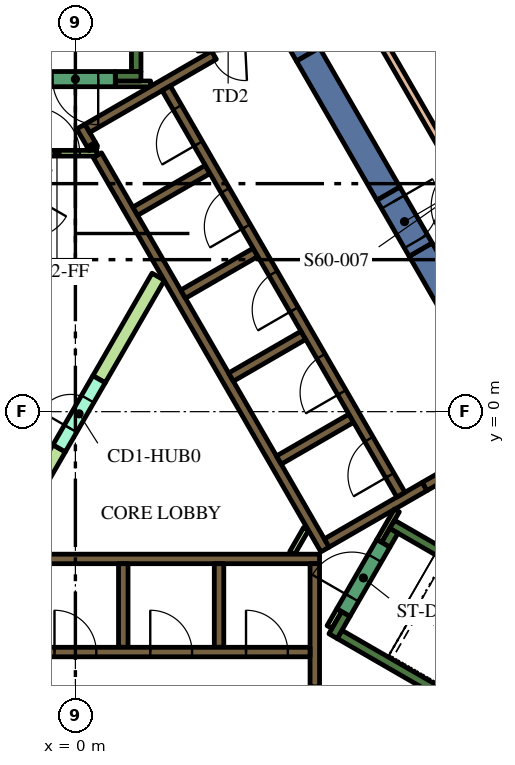
"""IFC4 building model, lengths in metres.
Left out: names, types, materials, properties, quantities, classifications, styles, units other than length and angle.
Written with IfcOpenShell. Run it as: python <this file> out.ifc"""

import sys

from ifc_helpers import new_model, si_unit, direction, frame, frame_2d, origin, place, context, subcontext, project, spatial, polyline, rectangle, outline, extrude, element, fill, save


model = new_model("IFC4")
c1 = context("Model", 3, precision=1e-05, world=origin(), true_north=direction((0.0, 1.0)))
c2 = subcontext(c1, "Body", "Model", "MODEL_VIEW")
j1 = project(units=[si_unit("LENGTHUNIT", "METRE"), si_unit("PLANEANGLEUNIT", "RADIAN")], contexts=[c1])
p1 = place(None, origin())
s1 = spatial("IfcSite", under=j1, at=p1, CompositionType="ELEMENT")
p2 = place(p1, origin())
s2 = spatial("IfcBuilding", under=s1, at=p2, CompositionType="ELEMENT")
p3 = place(p2, frame((0.0, 0.0, 256.2)))
s3 = spatial("IfcBuildingStorey", under=s2, at=p3, CompositionType="ELEMENT", Elevation=256.2)
p4 = place(p3, frame((9.085, 4.264, 0.0), z_axis=(0.0, 0.0, 1.0), x_axis=(0.499998082512, -0.866026510844, 0.0)))
e1 = element("IfcWall", 1, at=p4, inside=s3, PredefinedType="SOLIDWALL", context=c2, shape_type="SweptSolid", body=[
    extrude(rectangle(XDim=12.472, YDim=0.7, at=frame_2d((6.236, 0.0))), origin(), (0.0, 0.0, 1.0), 5.4),
])
p5 = place(p3, frame((6.12, 9.399, 0.0), z_axis=(0.0, 0.0, 1.0), x_axis=(-0.499792463624, 0.866145191815, 0.0)))
e2 = element("IfcWall", 2, at=p5, inside=s3, PredefinedType="SOLIDWALL", context=c2, shape_type="SweptSolid", body=[
    extrude(rectangle(XDim=0.302, YDim=0.7, at=frame_2d((0.151, 0.0))), origin(), (0.0, 0.0, 1.0), 5.4),
])
p6 = place(p3, frame((6.121, 9.398, 0.0), z_axis=(0.0, 0.0, 1.0), x_axis=(0.499995697976, -0.866027887545, 0.0)))
e3 = element("IfcWall", 3, at=p6, inside=s3, PredefinedType="SOLIDWALL", context=c2, shape_type="SweptSolid", body=[
    extrude(rectangle(XDim=4.228, YDim=0.7, at=frame_2d((2.114, 0.0))), origin(), (0.0, 0.0, 1.0), 5.4),
])
p7 = place(p3, frame((12.84, -9.261, 0.0), z_axis=(0.0, 0.0, 1.0), x_axis=(-0.866013990052, 0.500019768644, 0.0)))
e4 = element("IfcWall", 4, at=p7, inside=s3, PredefinedType="SOLIDWALL", context=c2, shape_type="SweptSolid", body=[
    extrude(rectangle(XDim=6.8, YDim=0.25, at=frame_2d((3.4, 0.0))), origin(), (0.0, 0.0, 1.0), 5.4),
])
p8 = place(p3, frame((6.78, -5.906, 0.0), z_axis=(0.0, 0.0, 1.0), x_axis=(0.500223362819, 0.865896406789, 0.0)))
e5 = element("IfcWall", 5, at=p8, inside=s3, PredefinedType="SOLIDWALL", context=c2, shape_type="SweptSolid", body=[
    extrude(rectangle(XDim=0.675, YDim=0.25, at=frame_2d((0.337, 0.0))), origin(), (0.0, 0.0, 1.0), 5.4),
])
p9 = place(p3, frame((8.334, -2.964, 0.0), z_axis=(0.0, 0.0, 1.0), x_axis=(0.866016039709, -0.500016218704, 0.0)))
e6 = element("IfcWall", 6, at=p9, inside=s3, PredefinedType="SOLIDWALL", context=c2, shape_type="SweptSolid", body=[
    extrude(rectangle(XDim=7.05, YDim=0.25, at=frame_2d((3.525, 0.0))), origin(), (0.0, 0.0, 1.0), 5.4),
])
p10 = place(p3, frame((8.168, -3.503, 0.0), z_axis=(0.0, 0.0, 1.0), x_axis=(0.49972245349, 0.866185586049, 0.0)))
e7 = element("IfcWall", 7, at=p10, inside=s3, PredefinedType="SOLIDWALL", context=c2, shape_type="SweptSolid", body=[
    extrude(rectangle(XDim=0.425, YDim=0.25, at=frame_2d((0.212, 0.0))), origin(), (0.0, 0.0, 1.0), 5.4),
])
p11 = place(p3, frame((1.6, 8.95, 0.0), z_axis=(0.0, 0.0, 1.0), x_axis=(0.0, 1.0, 0.0)))
e8 = element("IfcWall", 8, at=p11, inside=s3, PredefinedType="SOLIDWALL", context=c2, shape_type="SweptSolid", body=[
    extrude(rectangle(XDim=6.8, YDim=0.25, at=frame_2d((3.4, 0.0))), origin(), (0.0, 0.0, 1.0), 5.4),
])
p12 = place(p3, frame((1.05, 8.825, 0.0), z_axis=(0.0, 0.0, 1.0), x_axis=(1.0, 0.0, 0.0)))
e9 = element("IfcWall", 9, at=p12, inside=s3, PredefinedType="SOLIDWALL", context=c2, shape_type="SweptSolid", body=[
    extrude(rectangle(XDim=0.675, YDim=0.25, at=frame_2d((0.337, 0.0))), origin(), (0.0, 0.0, 1.0), 5.4),
])
p13 = place(p3, frame((-5.545, -3.875, 0.0), z_axis=(0.0, 0.0, 1.0), x_axis=(1.0, 0.0, 0.0)))
e10 = element("IfcWall", 10, at=p13, inside=s3, PredefinedType="SOLIDWALL", context=c2, shape_type="SweptSolid", body=[
    extrude(rectangle(XDim=11.97, YDim=0.25, at=frame_2d((5.985, 0.0))), origin(), (0.0, 0.0, 1.0), 5.4),
])
p14 = place(p3, frame((6.3, -7.24, 0.0), z_axis=(0.0, 0.0, 1.0), x_axis=(0.0, 1.0, 0.0)))
e11 = element("IfcWall", 11, at=p14, inside=s3, PredefinedType="SOLIDWALL", context=c2, shape_type="SweptSolid", body=[
    extrude(rectangle(XDim=3.24, YDim=0.25, at=frame_2d((1.62, 0.0))), origin(), (0.0, 0.0, 1.0), 5.4),
])
for number, where, z_axis, x_axis in (
    (12, (3.78, -4.0, 0.0), (0.0, 0.0, 1.0), (0.0, -1.0, 0.0)),
    (13, (1.26, -4.0, 0.0), (0.0, 0.0, 1.0), (0.0, -1.0, 0.0)),
):
    element("IfcWall", number, at=place(p3, frame(where, z_axis=z_axis, x_axis=x_axis)), inside=s3, PredefinedType="SOLIDWALL", context=c2, shape_type="SweptSolid", body=[
        extrude(rectangle(XDim=2.2, YDim=0.25, at=frame_2d((1.1, 0.0))), origin(), (0.0, 0.0, 1.0), 5.4),
    ])
p15 = place(p3, frame((0.473, 6.93, 0.0), z_axis=(0.0, 0.0, 1.0), x_axis=(-0.49972245349, 0.866185586049, 0.0)))
e14 = element("IfcWall", 14, at=p15, inside=s3, PredefinedType="SOLIDWALL", context=c2, shape_type="SweptSolid", body=[
    extrude(rectangle(XDim=0.11, YDim=0.25, at=frame_2d((0.055, 0.0))), origin(), (0.0, 0.0, 1.0), 5.4),
])
p16 = place(p3, frame((6.568, -3.627, 0.0), z_axis=(0.0, 0.0, 1.0), x_axis=(-0.499999455981, 0.866025717874, 0.0)))
e15 = element("IfcWall", 15, at=p16, inside=s3, PredefinedType="SOLIDWALL", context=c2, shape_type="SweptSolid", body=[
    extrude(rectangle(XDim=11.978, YDim=0.25, at=frame_2d((5.989, 0.0))), origin(), (0.0, 0.0, 1.0), 5.4),
])
p17 = place(p3, frame((0.417, 7.027, 0.0), z_axis=(0.0, 0.0, 1.0), x_axis=(-0.500210807569, 0.865903659763, 0.0)))
e16 = element("IfcWall", 16, at=p17, inside=s3, PredefinedType="SOLIDWALL", context=c2, shape_type="SweptSolid", body=[
    extrude(rectangle(XDim=0.548, YDim=0.25, at=frame_2d((0.274, 0.0))), origin(), (0.0, 0.0, 1.0), 5.4),
])
p18 = place(p3, frame((3.647, 9.38, 0.0), z_axis=(0.0, 0.0, 1.0), x_axis=(-0.866025015791, -0.500000672024, 0.0)))
e17 = element("IfcWall", 17, at=p18, inside=s3, PredefinedType="SOLIDWALL", context=c2, shape_type="SweptSolid", body=[
    extrude(rectangle(XDim=3.849, YDim=0.25, at=frame_2d((1.924, 0.0))), origin(), (0.0, 0.0, 1.0), 5.4),
])
p19 = place(p3, frame((1.574, 5.274, 0.0), z_axis=(0.0, 0.0, 1.0), x_axis=(0.866028486751, 0.499994660107, 0.0)))
e18 = element("IfcWall", 18, at=p19, inside=s3, PredefinedType="SOLIDWALL", context=c2, shape_type="SweptSolid", body=[
    extrude(rectangle(XDim=2.2, YDim=0.25, at=frame_2d((1.1, 0.0))), origin(), (0.0, 0.0, 1.0), 5.4),
])
for number, where, z_axis, x_axis in (
    (19, (2.834, 3.091, 0.0), (0.0, 0.0, 1.0), (0.866, 0.5, 0.0)),
    (20, (4.094, 0.909, 0.0), (0.0, 0.0, 1.0), (0.866, 0.5, 0.0)),
    (21, (5.354, -1.274, 0.0), (0.0, 0.0, 1.0), (0.866, 0.5, 0.0)),
):
    element("IfcWall", number, at=place(p3, frame(where, z_axis=z_axis, x_axis=x_axis)), inside=s3, PredefinedType="SOLIDWALL", context=c2, shape_type="SweptSolid", body=[
        extrude(rectangle(XDim=2.2, YDim=0.25, at=frame_2d((1.1, 0.0))), origin(), (0.0, 0.0, 1.0), 5.4),
    ])
p20 = place(p3, frame((6.614, -3.456, 0.0), z_axis=(0.0, 0.0, 1.0), x_axis=(0.866032512851, 0.499987686533, 0.0)))
e22 = element("IfcWall", 22, at=p20, inside=s3, PredefinedType="SOLIDWALL", context=c2, shape_type="SweptSolid", body=[
    extrude(rectangle(XDim=2.975, YDim=0.25, at=frame_2d((1.487, 0.0))), origin(), (0.0, 0.0, 1.0), 5.4),
])
p21 = place(p3, frame((1.05, 8.625, 0.0), z_axis=(0.0, 0.0, 1.0), x_axis=(1.0, 0.0, 0.0)))
e23 = element("IfcWall", 23, at=p21, inside=s3, PredefinedType="PARTITIONING", context=c2, shape_type="SweptSolid", body=[
    extrude(rectangle(XDim=0.929, YDim=0.15, at=frame_2d((0.464, 0.0))), origin(), (0.0, 0.0, 1.0), 4.3),
])
p22 = place(p3, frame((6.945, -5.222, 0.0), z_axis=(0.0, 0.0, 1.0), x_axis=(-0.499818422106, -0.866130212453, 0.0)))
e24 = element("IfcWall", 24, at=p22, inside=s3, PredefinedType="PARTITIONING", context=c2, shape_type="SweptSolid", body=[
    extrude(rectangle(XDim=0.514, YDim=0.15, at=frame_2d((0.257, 0.0))), origin(), (0.0, 0.0, 1.0), 4.3),
])
p23 = place(p3, frame((8.459, -2.599, 0.0), z_axis=(0.0, 0.0, 1.0), x_axis=(-0.500041054325, -0.866001699761, 0.0)))
e25 = element("IfcWall", 25, at=p23, inside=s3, PredefinedType="PARTITIONING", context=c2, shape_type="SweptSolid", body=[
    extrude(rectangle(XDim=0.929, YDim=0.15, at=frame_2d((0.464, 0.0))), origin(), (0.0, 0.0, 1.0), 5.4),
])
p24 = place(p3, frame((5.705, -3.718, 0.0), z_axis=(0.0, 0.0, 1.0), x_axis=(0.499962090823, 0.866047289552, 0.0)))
e26 = element("IfcWall", 26, at=p24, inside=s3, PredefinedType="PARTITIONING", context=c2, shape_type="SweptSolid", body=[
    extrude(rectangle(XDim=0.735, YDim=0.15, at=frame_2d((0.367, 0.0))), origin(), (0.0, 0.0, 1.0), 4.3),
])
p25 = place(p3, origin())
e27 = element("IfcWall", 27, at=p25, inside=s3, PredefinedType="PARTITIONING", context=c2, shape_type="SweptSolid", body=[
    extrude(outline(polyline([(2.017, 3.643), (2.342, 3.456), (0.785, 0.76), (0.46, 0.947), (2.017, 3.643)])), origin(), (0.0, 0.0, 1.0), 4.3),
])
e28 = element("IfcWall", 28, at=p25, inside=s3, PredefinedType="PARTITIONING", context=c2, shape_type="SweptSolid", body=[
    extrude(outline(polyline([(-0.59, -0.872), (-0.265, -1.059), (-1.822, -3.756), (-2.147, -3.568), (-0.59, -0.872)])), origin(), (0.0, 0.0, 1.0), 4.3),
])
p26 = place(p3, frame((-6.175, -6.325, 0.0), z_axis=(0.0, 0.0, 1.0), x_axis=(1.0, 0.0, 0.0)))
e29 = element("IfcWall", 29, at=p26, inside=s3, PredefinedType="SOLIDWALL", context=c2, shape_type="SweptSolid", body=[
    extrude(rectangle(XDim=12.35, YDim=0.25, at=frame_2d((6.175, 0.0))), origin(), (0.0, 0.0, 1.0), 5.4),
])
p27 = place(p26, frame((0.585, 0.0, 0.0)))
e30 = element("IfcOpeningElement", 30, at=p27, cuts=e29, PredefinedType="OPENING", context=c2, shape_type="SweptSolid", body=[
    extrude(rectangle(XDim=1.1, YDim=2.1, at=frame_2d((0.55, 1.05))), frame((0.0, 0.135, 0.0), z_axis=(0.0, -1.0, 0.0), x_axis=(1.0, 0.0, 0.0)), (0.0, 0.0, 1.0), 0.27),
])
p28 = place(p26, frame((3.105, 0.0, 0.0)))
e31 = element("IfcOpeningElement", 31, at=p28, cuts=e29, PredefinedType="OPENING", context=c2, shape_type="SweptSolid", body=[
    extrude(rectangle(XDim=1.1, YDim=2.1, at=frame_2d((0.55, 1.05))), frame((0.0, 0.135, 0.0), z_axis=(0.0, -1.0, 0.0), x_axis=(1.0, 0.0, 0.0)), (0.0, 0.0, 1.0), 0.27),
])
p29 = place(p26, frame((5.625, 0.0, 0.0)))
e32 = element("IfcOpeningElement", 32, at=p29, cuts=e29, PredefinedType="OPENING", context=c2, shape_type="SweptSolid", body=[
    extrude(rectangle(XDim=1.1, YDim=2.1, at=frame_2d((0.55, 1.05))), frame((0.0, 0.135, 0.0), z_axis=(0.0, -1.0, 0.0), x_axis=(1.0, 0.0, 0.0)), (0.0, 0.0, 1.0), 0.27),
])
p30 = place(p26, frame((8.145, 0.0, 0.0)))
e33 = element("IfcOpeningElement", 33, at=p30, cuts=e29, PredefinedType="OPENING", context=c2, shape_type="SweptSolid", body=[
    extrude(rectangle(XDim=1.1, YDim=2.1, at=frame_2d((0.55, 1.05))), frame((0.0, 0.135, 0.0), z_axis=(0.0, -1.0, 0.0), x_axis=(1.0, 0.0, 0.0)), (0.0, 0.0, 1.0), 0.27),
])
p31 = place(p26, frame((10.665, 0.0, 0.0)))
e34 = element("IfcOpeningElement", 34, at=p31, cuts=e29, PredefinedType="OPENING", context=c2, shape_type="SweptSolid", body=[
    extrude(rectangle(XDim=1.1, YDim=2.1, at=frame_2d((0.55, 1.05))), frame((0.0, 0.135, 0.0), z_axis=(0.0, -1.0, 0.0), x_axis=(1.0, 0.0, 0.0)), (0.0, 0.0, 1.0), 0.27),
])
p32 = place(p3, frame((8.565, -2.185, 0.0), z_axis=(0.0, 0.0, 1.0), x_axis=(-0.499997954832, 0.866026584559, 0.0)))
e35 = element("IfcWall", 35, at=p32, inside=s3, PredefinedType="SOLIDWALL", context=c2, shape_type="SweptSolid", body=[
    extrude(rectangle(XDim=12.35, YDim=0.25, at=frame_2d((6.175, 0.0))), origin(), (0.0, 0.0, 1.0), 5.4),
])
p33 = place(p32, frame((0.585, 0.0, 0.0)))
e36 = element("IfcOpeningElement", 36, at=p33, cuts=e35, PredefinedType="OPENING", context=c2, shape_type="SweptSolid", body=[
    extrude(rectangle(XDim=1.1, YDim=2.1, at=frame_2d((0.55, 1.05))), frame((0.0, 0.135, 0.0), z_axis=(0.0, -1.0, 0.0), x_axis=(1.0, 0.0, 0.0)), (0.0, 0.0, 1.0), 0.27),
])
p34 = place(p32, frame((3.105, 0.0, 0.0)))
e37 = element("IfcOpeningElement", 37, at=p34, cuts=e35, PredefinedType="OPENING", context=c2, shape_type="SweptSolid", body=[
    extrude(rectangle(XDim=1.1, YDim=2.1, at=frame_2d((0.55, 1.05))), frame((0.0, 0.135, 0.0), z_axis=(0.0, -1.0, 0.0), x_axis=(1.0, 0.0, 0.0)), (0.0, 0.0, 1.0), 0.27),
])
p35 = place(p32, frame((5.625, 0.0, 0.0)))
e38 = element("IfcOpeningElement", 38, at=p35, cuts=e35, PredefinedType="OPENING", context=c2, shape_type="SweptSolid", body=[
    extrude(rectangle(XDim=1.1, YDim=2.1, at=frame_2d((0.55, 1.05))), frame((0.0, 0.135, 0.0), z_axis=(0.0, -1.0, 0.0), x_axis=(1.0, 0.0, 0.0)), (0.0, 0.0, 1.0), 0.27),
])
p36 = place(p32, frame((8.145, 0.0, 0.0)))
e39 = element("IfcOpeningElement", 39, at=p36, cuts=e35, PredefinedType="OPENING", context=c2, shape_type="SweptSolid", body=[
    extrude(rectangle(XDim=1.1, YDim=2.1, at=frame_2d((0.55, 1.05))), frame((0.0, 0.135, 0.0), z_axis=(0.0, -1.0, 0.0), x_axis=(1.0, 0.0, 0.0)), (0.0, 0.0, 1.0), 0.27),
])
p37 = place(p32, frame((10.665, 0.0, 0.0)))
e40 = element("IfcOpeningElement", 40, at=p37, cuts=e35, PredefinedType="OPENING", context=c2, shape_type="SweptSolid", body=[
    extrude(rectangle(XDim=1.1, YDim=2.1, at=frame_2d((0.55, 1.05))), frame((0.0, 0.135, 0.0), z_axis=(0.0, -1.0, 0.0), x_axis=(1.0, 0.0, 0.0)), (0.0, 0.0, 1.0), 0.27),
])
p38 = place(p3, frame((7.053, -5.284, 0.0), z_axis=(0.0, 0.0, 1.0), x_axis=(0.500078061341, 0.865980330357, 0.0)))
e41 = element("IfcWall", 41, at=p38, inside=s3, PredefinedType="SOLIDWALL", context=c2, shape_type="SweptSolid", body=[
    extrude(rectangle(XDim=2.1, YDim=0.4, at=frame_2d((1.05, 0.0))), origin(), (0.0, 0.0, 1.0), 5.4),
])
p39 = place(p38, frame((0.45, 0.0, 0.0)))
e42 = element("IfcOpeningElement", 42, at=p39, cuts=e41, PredefinedType="OPENING", context=c2, shape_type="SweptSolid", body=[
    extrude(rectangle(XDim=1.2, YDim=2.1, at=frame_2d((0.6, 1.05))), frame((0.0, 0.21, 0.0), z_axis=(0.0, -1.0, 0.0), x_axis=(1.0, 0.0, 0.0)), (0.0, 0.0, 1.0), 0.42),
])
p40 = place(p3, frame((1.05, 8.75, 0.0), z_axis=(0.0, 0.0, 1.0), x_axis=(-1.0, 0.0, 0.0)))
e43 = element("IfcWall", 43, at=p40, inside=s3, PredefinedType="SOLIDWALL", context=c2, shape_type="SweptSolid", body=[
    extrude(rectangle(XDim=2.1, YDim=0.4, at=frame_2d((1.05, 0.0))), origin(), (0.0, 0.0, 1.0), 5.4),
])
p41 = place(p40, frame((0.45, 0.0, 0.0)))
e44 = element("IfcOpeningElement", 44, at=p41, cuts=e43, PredefinedType="OPENING", context=c2, shape_type="SweptSolid", body=[
    extrude(rectangle(XDim=1.2, YDim=2.1, at=frame_2d((0.6, 1.05))), frame((0.0, 0.21, 0.0), z_axis=(0.0, -1.0, 0.0), x_axis=(1.0, 0.0, 0.0)), (0.0, 0.0, 1.0), 0.42),
])
p42 = place(p3, frame((-0.427, -0.966, 0.0), z_axis=(0.0, 0.0, 1.0), x_axis=(0.49994051562, 0.866059744384, 0.0)))
e45 = element("IfcWall", 45, at=p42, inside=s3, PredefinedType="PARTITIONING", context=c2, shape_type="SweptSolid", body=[
    extrude(rectangle(XDim=2.1, YDim=0.375, at=frame_2d((1.05, 0.0))), origin(), (0.0, 0.0, 1.0), 4.3),
])
p43 = place(p42, frame((0.6, 0.0, 0.0)))
e46 = element("IfcOpeningElement", 46, at=p43, cuts=e45, PredefinedType="OPENING", context=c2, shape_type="SweptSolid", body=[
    extrude(rectangle(XDim=0.9, YDim=2.1, at=frame_2d((0.45, 1.05))), frame((0.0, 0.198, 0.0), z_axis=(0.0, -1.0, 0.0), x_axis=(1.0, 0.0, 0.0)), (0.0, 0.0, 1.0), 0.395),
])
p44 = place(p3, frame((-1.534, 6.8, 0.0), z_axis=(0.0, 0.0, 1.0), x_axis=(1.0, 0.0, 0.0)))
e47 = element("IfcWall", 47, at=p44, inside=s3, PredefinedType="PARTITIONING", context=c2, shape_type="SweptSolid", body=[
    extrude(rectangle(XDim=2.1, YDim=0.15, at=frame_2d((1.05, 0.0))), origin(), (0.0, 0.0, 1.0), 4.3),
])
p45 = place(p44, frame((0.45, 0.0, 0.0)))
e48 = element("IfcOpeningElement", 48, at=p45, cuts=e47, PredefinedType="OPENING", context=c2, shape_type="SweptSolid", body=[
    extrude(rectangle(XDim=1.2, YDim=2.1, at=frame_2d((0.6, 1.05))), frame((0.0, 0.085, 0.0), z_axis=(0.0, -1.0, 0.0), x_axis=(1.0, 0.0, 0.0)), (0.0, 0.0, 1.0), 0.17),
])
p46 = place(p3, frame((11.009, -0.919, 0.0), z_axis=(0.0, 0.0, 1.0), x_axis=(-0.866059744384, -0.49994051562, 0.0)))
e49 = element("IfcWall", 49, at=p46, inside=s3, PredefinedType="SOLIDWALL", context=c2, shape_type="SweptSolid", body=[
    extrude(rectangle(XDim=2.1, YDim=0.25, at=frame_2d((1.05, 0.0))), origin(), (0.0, 0.0, 1.0), 5.4),
])
p47 = place(p46, frame((0.45, 0.0, 0.0)))
e50 = element("IfcOpeningElement", 50, at=p47, cuts=e49, PredefinedType="OPENING", context=c2, shape_type="SweptSolid", body=[
    extrude(rectangle(XDim=1.2, YDim=2.1, at=frame_2d((0.6, 1.05))), frame((0.0, 0.135, 0.0), z_axis=(0.0, -1.0, 0.0), x_axis=(1.0, 0.0, 0.0)), (0.0, 0.0, 1.0), 0.27),
])
p48 = place(p3, frame((8.235, 5.736, 0.0), z_axis=(0.0, 0.0, 1.0), x_axis=(0.499954529098, -0.86605165483, 0.0)))
e51 = element("IfcWall", 51, at=p48, inside=s3, PredefinedType="SOLIDWALL", context=c2, shape_type="SweptSolid", body=[
    extrude(rectangle(XDim=1.7, YDim=0.7, at=frame_2d((0.85, 0.0))), origin(), (0.0, 0.0, 1.0), 5.4),
])
p49 = place(p48, frame((0.25, 0.0, 0.0)))
e52 = element("IfcOpeningElement", 52, at=p49, cuts=e51, PredefinedType="OPENING", context=c2, shape_type="SweptSolid", body=[
    extrude(rectangle(XDim=1.2, YDim=2.1, at=frame_2d((0.6, 1.05))), frame((0.0, 0.36, 0.0), z_axis=(0.0, -1.0, 0.0), x_axis=(1.0, 0.0, 0.0)), (0.0, 0.0, 1.0), 0.72),
])
p50 = place(p3, frame((14.833, -1.99, 0.0), z_axis=(0.0, 0.0, 1.0), x_axis=(-0.500002996416, 0.866023673796, 0.0)))
e53 = element("IfcWall", 53, at=p50, inside=s3, PredefinedType="PARTITIONING", context=c2, shape_type="SweptSolid", body=[
    extrude(rectangle(XDim=18.28, YDim=0.2, at=frame_2d((9.14, 0.0))), origin(), (0.0, 0.0, 1.0), 4.3),
])
p51 = place(p50, frame((8.54, 0.0, 0.0)))
e54 = element("IfcOpeningElement", 54, at=p51, cuts=e53, PredefinedType="OPENING", context=c2, shape_type="SweptSolid", body=[
    extrude(rectangle(XDim=1.2, YDim=2.1, at=frame_2d((0.6, 1.05))), frame((0.0, 0.11, 0.0), z_axis=(0.0, -1.0, 0.0), x_axis=(1.0, 0.0, 0.0)), (0.0, 0.0, 1.0), 0.22),
])
p52 = place(p29, origin())
e55 = element("IfcDoor", 55, at=p52, inside=s3, OperationType="DOUBLE_DOOR_SLIDING", PredefinedType="DOOR", context=c2, shape_type="SweptSolid", body=[
    extrude(rectangle(XDim=1.1, YDim=2.1, at=frame_2d((0.55, 1.05))), frame((0.0, 0.025, 0.0), z_axis=(0.0, -1.0, 0.0), x_axis=(1.0, 0.0, 0.0)), (0.0, 0.0, 1.0), 0.05),
])
fill(e32, e55)
p53 = place(p30, origin())
e56 = element("IfcDoor", 56, at=p53, inside=s3, OperationType="DOUBLE_DOOR_SLIDING", PredefinedType="DOOR", context=c2, shape_type="SweptSolid", body=[
    extrude(rectangle(XDim=1.1, YDim=2.1, at=frame_2d((0.55, 1.05))), frame((0.0, 0.025, 0.0), z_axis=(0.0, -1.0, 0.0), x_axis=(1.0, 0.0, 0.0)), (0.0, 0.0, 1.0), 0.05),
])
fill(e33, e56)
p54 = place(p31, origin())
e57 = element("IfcDoor", 57, at=p54, inside=s3, OperationType="DOUBLE_DOOR_SLIDING", PredefinedType="DOOR", context=c2, shape_type="SweptSolid", body=[
    extrude(rectangle(XDim=1.1, YDim=2.1, at=frame_2d((0.55, 1.05))), frame((0.0, 0.025, 0.0), z_axis=(0.0, -1.0, 0.0), x_axis=(1.0, 0.0, 0.0)), (0.0, 0.0, 1.0), 0.05),
])
fill(e34, e57)
p55 = place(p33, origin())
e58 = element("IfcDoor", 58, at=p55, inside=s3, OperationType="DOUBLE_DOOR_SLIDING", PredefinedType="DOOR", context=c2, shape_type="SweptSolid", body=[
    extrude(rectangle(XDim=1.1, YDim=2.1, at=frame_2d((0.55, 1.05))), frame((0.0, 0.025, 0.0), z_axis=(0.0, -1.0, 0.0), x_axis=(1.0, 0.0, 0.0)), (0.0, 0.0, 1.0), 0.05),
])
fill(e36, e58)
p56 = place(p34, origin())
e59 = element("IfcDoor", 59, at=p56, inside=s3, OperationType="DOUBLE_DOOR_SLIDING", PredefinedType="DOOR", context=c2, shape_type="SweptSolid", body=[
    extrude(rectangle(XDim=1.1, YDim=2.1, at=frame_2d((0.55, 1.05))), frame((0.0, 0.025, 0.0), z_axis=(0.0, -1.0, 0.0), x_axis=(1.0, 0.0, 0.0)), (0.0, 0.0, 1.0), 0.05),
])
fill(e37, e59)
p57 = place(p35, origin())
e60 = element("IfcDoor", 60, at=p57, inside=s3, OperationType="DOUBLE_DOOR_SLIDING", PredefinedType="DOOR", context=c2, shape_type="SweptSolid", body=[
    extrude(rectangle(XDim=1.1, YDim=2.1, at=frame_2d((0.55, 1.05))), frame((0.0, 0.025, 0.0), z_axis=(0.0, -1.0, 0.0), x_axis=(1.0, 0.0, 0.0)), (0.0, 0.0, 1.0), 0.05),
])
fill(e38, e60)
p58 = place(p36, origin())
e61 = element("IfcDoor", 61, at=p58, inside=s3, OperationType="DOUBLE_DOOR_SLIDING", PredefinedType="DOOR", context=c2, shape_type="SweptSolid", body=[
    extrude(rectangle(XDim=1.1, YDim=2.1, at=frame_2d((0.55, 1.05))), frame((0.0, 0.025, 0.0), z_axis=(0.0, -1.0, 0.0), x_axis=(1.0, 0.0, 0.0)), (0.0, 0.0, 1.0), 0.05),
])
fill(e39, e61)
p59 = place(p37, origin())
e62 = element("IfcDoor", 62, at=p59, inside=s3, OperationType="DOUBLE_DOOR_SLIDING", PredefinedType="DOOR", context=c2, shape_type="SweptSolid", body=[
    extrude(rectangle(XDim=1.1, YDim=2.1, at=frame_2d((0.55, 1.05))), frame((0.0, 0.025, 0.0), z_axis=(0.0, -1.0, 0.0), x_axis=(1.0, 0.0, 0.0)), (0.0, 0.0, 1.0), 0.05),
])
fill(e40, e62)
p60 = place(p39, origin())
e63 = element("IfcDoor", 63, at=p60, inside=s3, OperationType="SINGLE_SWING_LEFT", PredefinedType="DOOR", context=c2, shape_type="SweptSolid", body=[
    extrude(rectangle(XDim=1.2, YDim=2.1, at=frame_2d((0.6, 1.05))), frame((0.0, 0.025, 0.0), z_axis=(0.0, -1.0, 0.0), x_axis=(1.0, 0.0, 0.0)), (0.0, 0.0, 1.0), 0.05),
])
fill(e42, e63)
p61 = place(p41, origin())
e64 = element("IfcDoor", 64, at=p61, inside=s3, OperationType="SINGLE_SWING_LEFT", PredefinedType="DOOR", context=c2, shape_type="SweptSolid", body=[
    extrude(rectangle(XDim=1.2, YDim=2.1, at=frame_2d((0.6, 1.05))), frame((0.0, 0.025, 0.0), z_axis=(0.0, -1.0, 0.0), x_axis=(1.0, 0.0, 0.0)), (0.0, 0.0, 1.0), 0.05),
])
fill(e44, e64)
p62 = place(p43, origin())
e65 = element("IfcDoor", 65, at=p62, inside=s3, OperationType="SINGLE_SWING_LEFT", PredefinedType="DOOR", context=c2, shape_type="SweptSolid", body=[
    extrude(rectangle(XDim=0.9, YDim=2.1, at=frame_2d((0.45, 1.05))), frame((0.0, 0.025, 0.0), z_axis=(0.0, -1.0, 0.0), x_axis=(1.0, 0.0, 0.0)), (0.0, 0.0, 1.0), 0.05),
])
fill(e46, e65)
p63 = place(p45, origin())
e66 = element("IfcDoor", 66, at=p63, inside=s3, OperationType="SINGLE_SWING_LEFT", PredefinedType="DOOR", context=c2, shape_type="SweptSolid", body=[
    extrude(rectangle(XDim=1.2, YDim=2.1, at=frame_2d((0.6, 1.05))), frame((0.0, 0.025, 0.0), z_axis=(0.0, -1.0, 0.0), x_axis=(1.0, 0.0, 0.0)), (0.0, 0.0, 1.0), 0.05),
])
fill(e48, e66)
p64 = place(p49, origin())
e67 = element("IfcDoor", 67, at=p64, inside=s3, OperationType="SINGLE_SWING_LEFT", PredefinedType="DOOR", context=c2, shape_type="SweptSolid", body=[
    extrude(rectangle(XDim=1.2, YDim=2.1, at=frame_2d((0.6, 1.05))), frame((0.0, 0.025, 0.0), z_axis=(0.0, -1.0, 0.0), x_axis=(1.0, 0.0, 0.0)), (0.0, 0.0, 1.0), 0.05),
])
fill(e52, e67)
save(model, sys.argv[1])
